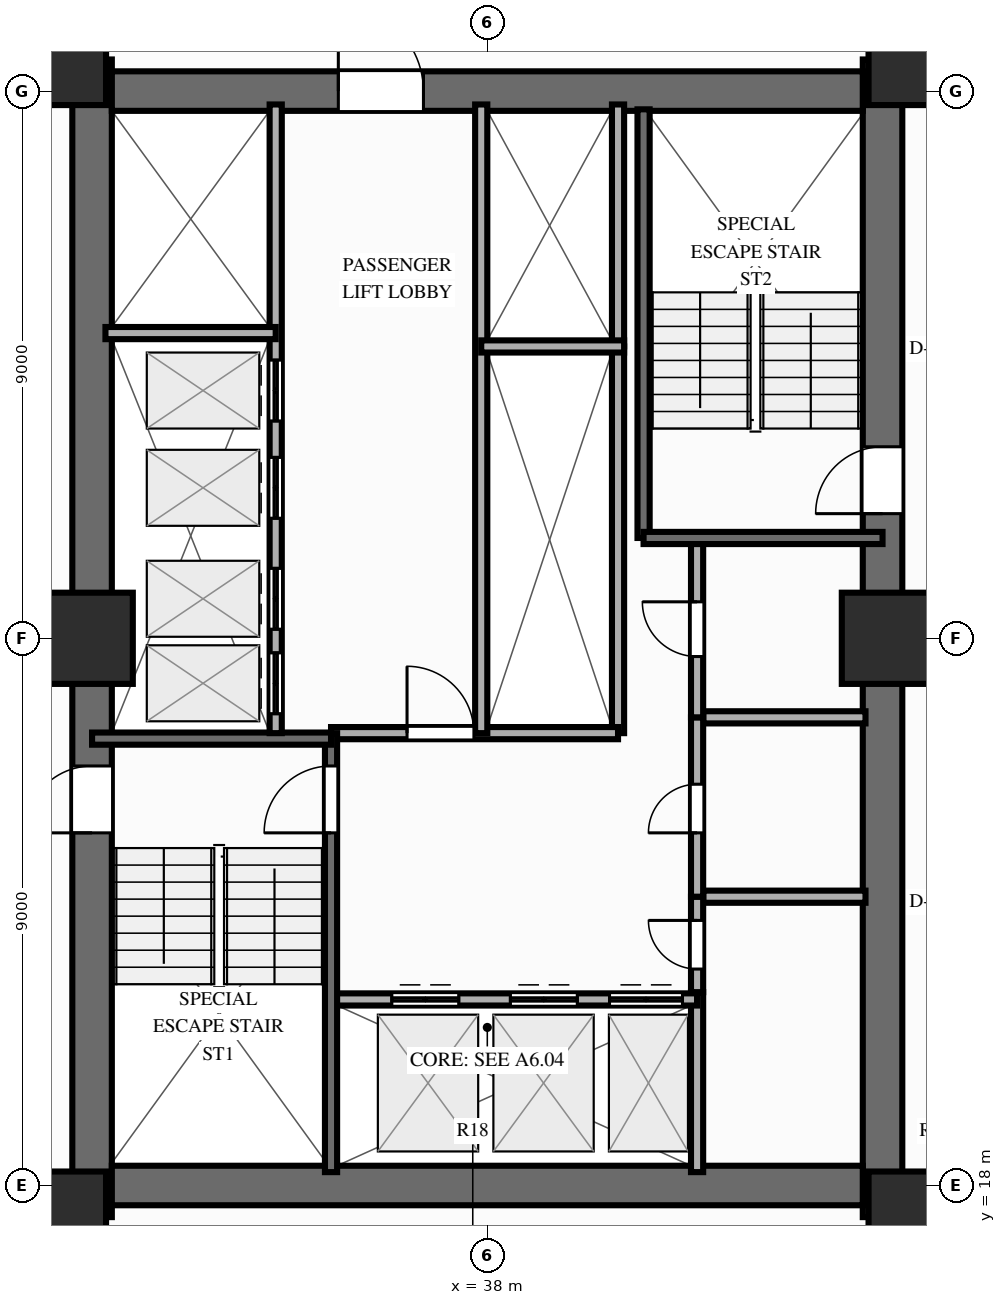
"""IFC4 building model, lengths in metres.
Left out: names, types, materials, properties, quantities, classifications, styles, units other than length and angle.
Written with IfcOpenShell. Run it as: python <this file> out.ifc"""

import sys

from ifc_helpers import new_model, si_unit, direction, frame, frame_2d, origin, origin_2d, place, context, subcontext, project, spatial, rectangle, extrude, source, transform, mapped, element, fill, save


model = new_model("IFC4")
c1 = context("Model", 3, precision=1e-05, world=origin(), true_north=direction((0.0, 1.0)))
c2 = subcontext(c1, "Body", "Model", "MODEL_VIEW")
j1 = project(units=[si_unit("LENGTHUNIT", "METRE"), si_unit("PLANEANGLEUNIT", "RADIAN")], contexts=[c1])
p1 = place(None, origin())
s1 = spatial("IfcSite", under=j1, at=p1, CompositionType="ELEMENT")
p2 = place(p1, origin())
s2 = spatial("IfcBuilding", under=s1, at=p2, CompositionType="ELEMENT")
p3 = place(p2, frame((0.0, 0.0, 61.4)))
s3 = spatial("IfcBuildingStorey", under=s2, at=p3, CompositionType="ELEMENT", Elevation=61.4)
p4 = place(p3, frame((31.5, 17.48, 0.0), z_axis=(0.0, 0.0, 1.0), x_axis=(0.0, 1.0, 0.0)))
e1 = element("IfcWall", 1, at=p4, inside=s3, PredefinedType="SHEAR", context=c2, shape_type="SweptSolid", body=[
    extrude(rectangle(XDim=19.04, YDim=0.65, at=frame_2d((9.52, 0.0))), origin(), (0.0, 0.0, 1.0), 3.0),
])
p5 = place(p4, frame((6.32, 0.0, 0.0)))
e2 = element("IfcOpeningElement", 2, at=p5, cuts=e1, PredefinedType="OPENING", context=c2, shape_type="SweptSolid", body=[
    extrude(rectangle(XDim=1.1, YDim=2.15, at=frame_2d((0.55, 1.075))), frame((0.0, 0.337, 0.0), z_axis=(0.0, -1.0, 0.0), x_axis=(1.0, 0.0, 0.0)), (0.0, 0.0, 1.0), 0.674),
])
p6 = place(p3, frame((44.5, 17.48, 0.0), z_axis=(0.0, 0.0, 1.0), x_axis=(0.0, 1.0, 0.0)))
e3 = element("IfcWall", 3, at=p6, inside=s3, PredefinedType="SHEAR", context=c2, shape_type="SweptSolid", body=[
    extrude(rectangle(XDim=19.04, YDim=0.65, at=frame_2d((9.52, 0.0))), origin(), (0.0, 0.0, 1.0), 3.0),
])
p7 = place(p6, frame((12.67, 0.0, 0.0), z_axis=(0.0, 0.0, 1.0), x_axis=(-1.0, 0.0, 0.0)))
e4 = element("IfcOpeningElement", 4, at=p7, cuts=e3, PredefinedType="OPENING", context=c2, shape_type="SweptSolid", body=[
    extrude(rectangle(XDim=1.1, YDim=2.15, at=frame_2d((0.55, 1.075))), frame((0.0, 0.337, 0.0), z_axis=(0.0, -1.0, 0.0), x_axis=(1.0, 0.0, 0.0)), (0.0, 0.0, 1.0), 0.674),
])
p8 = place(p3, frame((31.825, 18.0, 0.0), z_axis=(0.0, 0.0, 1.0), x_axis=(1.0, 0.0, 0.0)))
e5 = element("IfcWall", 5, at=p8, inside=s3, PredefinedType="SHEAR", context=c2, shape_type="SweptSolid", body=[
    extrude(rectangle(XDim=12.35, YDim=0.65, at=frame_2d((6.175, 0.0))), origin(), (0.0, 0.0, 1.0), 3.0),
])
p9 = place(p3, frame((31.825, 36.0, 0.0), z_axis=(0.0, 0.0, 1.0), x_axis=(1.0, 0.0, 0.0)))
e6 = element("IfcWall", 6, at=p9, inside=s3, PredefinedType="SHEAR", context=c2, shape_type="SweptSolid", body=[
    extrude(rectangle(XDim=12.35, YDim=0.65, at=frame_2d((6.175, 0.0))), origin(), (0.0, 0.0, 1.0), 3.0),
])
p10 = place(p9, frame((5.125, 0.0, 0.0), z_axis=(0.0, 0.0, 1.0), x_axis=(-1.0, 0.0, 0.0)))
e7 = element("IfcOpeningElement", 7, at=p10, cuts=e6, PredefinedType="OPENING", context=c2, shape_type="SweptSolid", body=[
    extrude(rectangle(XDim=1.4, YDim=2.15, at=frame_2d((0.7, 1.075))), frame((0.0, 0.337, 0.0), z_axis=(0.0, -1.0, 0.0), x_axis=(1.0, 0.0, 0.0)), (0.0, 0.0, 1.0), 0.674),
])
m1 = source(origin(), c2, "Body", "SweptSolid", [
    extrude(rectangle(XDim=1.5, YDim=1.5, at=origin_2d()), origin(), (0.0, 0.0, 1.0), 3.0),
])
for number, where, z_axis, x_axis in (
    (8, (30.98, 17.48, 0.0), (0.0, 0.0, 1.0), (1.0, 0.0, 0.0)),
    (9, (45.02, 17.48, 0.0), (0.0, 0.0, 1.0), (1.0, 0.0, 0.0)),
    (10, (30.98, 36.52, 0.0), (0.0, 0.0, 1.0), (1.0, 0.0, 0.0)),
    (11, (45.02, 36.52, 0.0), (0.0, 0.0, 1.0), (1.0, 0.0, 0.0)),
    (12, (31.42, 27.0, 0.0), (0.0, 0.0, 1.0), (1.0, 0.0, 0.0)),
    (13, (44.58, 27.0, 0.0), (0.0, 0.0, 1.0), (1.0, 0.0, 0.0)),
):
    element("IfcColumn", number, at=place(p3, frame(where, z_axis=z_axis, x_axis=x_axis)), inside=s3, PredefinedType="COLUMN", context=c2, shape_type="MappedRepresentation", body=[
        mapped(m1, transform((0.0, 0.0, 0.0), scale=1.0)),
    ])
p11 = place(p3, frame((41.55, 22.75, 0.0), z_axis=(0.0, 0.0, 1.0), x_axis=(1.0, 0.0, 0.0)))
e14 = element("IfcWall", 14, at=p11, inside=s3, PredefinedType="PARTITIONING", context=c2, shape_type="SweptSolid", body=[
    extrude(rectangle(XDim=2.67, YDim=0.2, at=frame_2d((1.335, 0.0))), origin(), (0.0, 0.0, 1.0), 2.79),
])
p12 = place(p3, frame((41.55, 25.7, 0.0), z_axis=(0.0, 0.0, 1.0), x_axis=(1.0, 0.0, 0.0)))
e15 = element("IfcWall", 15, at=p12, inside=s3, PredefinedType="PARTITIONING", context=c2, shape_type="SweptSolid", body=[
    extrude(rectangle(XDim=2.67, YDim=0.2, at=frame_2d((1.335, 0.0))), origin(), (0.0, 0.0, 1.0), 2.14),
])
p13 = place(p3, frame((41.45, 18.22, 0.0), z_axis=(0.0, 0.0, 1.0), x_axis=(0.0, 1.0, 0.0)))
e16 = element("IfcWall", 16, at=p13, inside=s3, PredefinedType="PARTITIONING", context=c2, shape_type="SweptSolid", body=[
    extrude(rectangle(XDim=2.96, YDim=0.2, at=frame_2d((1.48, 0.0))), origin(), (0.0, 0.0, 1.0), 2.79),
])
p14 = place(p3, frame((41.45, 21.18, 0.0), z_axis=(0.0, 0.0, 1.0), x_axis=(0.0, 1.0, 0.0)))
e17 = element("IfcWall", 17, at=p14, inside=s3, PredefinedType="PARTITIONING", context=c2, shape_type="SweptSolid", body=[
    extrude(rectangle(XDim=1.57, YDim=0.2, at=frame_2d((0.785, 0.0))), origin(), (0.0, 0.0, 1.0), 2.79),
])
p15 = place(p14, frame((0.38, 0.0, 0.0)))
e18 = element("IfcOpeningElement", 18, at=p15, cuts=e17, PredefinedType="OPENING", context=c2, shape_type="SweptSolid", body=[
    extrude(rectangle(XDim=0.8, YDim=2.05, at=frame_2d((0.4, 1.025))), frame((0.0, 0.112, 0.0), z_axis=(0.0, -1.0, 0.0), x_axis=(1.0, 0.0, 0.0)), (0.0, 0.0, 1.0), 0.224),
])
p16 = place(p3, frame((41.45, 22.75, 0.0), z_axis=(0.0, 0.0, 1.0), x_axis=(0.0, 1.0, 0.0)))
e19 = element("IfcWall", 19, at=p16, inside=s3, PredefinedType="PARTITIONING", context=c2, shape_type="SweptSolid", body=[
    extrude(rectangle(XDim=2.95, YDim=0.2, at=frame_2d((1.475, 0.0))), origin(), (0.0, 0.0, 1.0), 2.79),
])
p17 = place(p16, frame((1.05, 0.0, 0.0)))
e20 = element("IfcOpeningElement", 20, at=p17, cuts=e19, PredefinedType="OPENING", context=c2, shape_type="SweptSolid", body=[
    extrude(rectangle(XDim=0.8, YDim=2.05, at=frame_2d((0.4, 1.025))), frame((0.0, 0.112, 0.0), z_axis=(0.0, -1.0, 0.0), x_axis=(1.0, 0.0, 0.0)), (0.0, 0.0, 1.0), 0.224),
])
p18 = place(p3, frame((41.45, 25.7, 0.0), z_axis=(0.0, 0.0, 1.0), x_axis=(0.0, 1.0, 0.0)))
e21 = element("IfcWall", 21, at=p18, inside=s3, PredefinedType="PARTITIONING", context=c2, shape_type="SweptSolid", body=[
    extrude(rectangle(XDim=2.9, YDim=0.2, at=frame_2d((1.45, 0.0))), origin(), (0.0, 0.0, 1.0), 2.79),
])
p19 = place(p18, frame((1.0, 0.0, 0.0)))
e22 = element("IfcOpeningElement", 22, at=p19, cuts=e21, PredefinedType="OPENING", context=c2, shape_type="SweptSolid", body=[
    extrude(rectangle(XDim=0.9, YDim=2.1, at=frame_2d((0.45, 1.05))), frame((0.0, 0.112, 0.0), z_axis=(0.0, -1.0, 0.0), x_axis=(1.0, 0.0, 0.0)), (0.0, 0.0, 1.0), 0.224),
])
p20 = place(p3, frame((40.15, 25.44, 0.0), z_axis=(0.0, 0.0, 1.0), x_axis=(0.0, 1.0, 0.0)))
e23 = element("IfcWall", 23, at=p20, inside=s3, PredefinedType="PARTITIONING", context=c2, shape_type="SweptSolid", body=[
    extrude(rectangle(XDim=6.36, YDim=0.2, at=frame_2d((3.18, 0.0))), origin(), (0.0, 0.0, 1.0), 2.79),
])
p21 = place(p3, frame((40.15, 31.8, 0.0), z_axis=(0.0, 0.0, 1.0), x_axis=(0.0, 1.0, 0.0)))
e24 = element("IfcWall", 24, at=p21, inside=s3, PredefinedType="PARTITIONING", context=c2, shape_type="SweptSolid", body=[
    extrude(rectangle(XDim=3.98, YDim=0.2, at=frame_2d((1.99, 0.0))), origin(), (0.0, 0.0, 1.0), 2.79),
])
p22 = place(p3, frame((35.43, 21.06, 0.0), z_axis=(0.0, 0.0, 1.0), x_axis=(1.0, 0.0, 0.0)))
e25 = element("IfcWall", 25, at=p22, inside=s3, PredefinedType="PARTITIONING", context=c2, shape_type="SweptSolid", body=[
    extrude(rectangle(XDim=6.02, YDim=0.2, at=frame_2d((3.01, 0.0))), origin(), (0.0, 0.0, 1.0), 2.79),
])
p23 = place(p22, frame((1.0, 0.0, 0.0)))
e26 = element("IfcOpeningElement", 26, at=p23, cuts=e25, PredefinedType="OPENING", context=c2, shape_type="SweptSolid", body=[
    extrude(rectangle(XDim=1.1, YDim=2.15, at=frame_2d((0.55, 1.075))), frame((0.0, 0.112, 0.0), z_axis=(0.0, -1.0, 0.0), x_axis=(1.0, 0.0, 0.0)), (0.0, 0.0, 1.0), 0.224),
])
p24 = place(p22, frame((2.95, 0.0, 0.0)))
e27 = element("IfcOpeningElement", 27, at=p24, cuts=e25, PredefinedType="OPENING", context=c2, shape_type="SweptSolid", body=[
    extrude(rectangle(XDim=1.1, YDim=2.15, at=frame_2d((0.55, 1.075))), frame((0.0, 0.112, 0.0), z_axis=(0.0, -1.0, 0.0), x_axis=(1.0, 0.0, 0.0)), (0.0, 0.0, 1.0), 0.224),
])
p25 = place(p22, frame((4.58, 0.0, 0.0)))
e28 = element("IfcOpeningElement", 28, at=p25, cuts=e25, PredefinedType="OPENING", context=c2, shape_type="SweptSolid", body=[
    extrude(rectangle(XDim=1.2, YDim=2.15, at=frame_2d((0.6, 1.075))), frame((0.0, 0.112, 0.0), z_axis=(0.0, -1.0, 0.0), x_axis=(1.0, 0.0, 0.0)), (0.0, 0.0, 1.0), 0.224),
])
p26 = place(p3, frame((35.43, 25.44, 0.0), z_axis=(0.0, 0.0, 1.0), x_axis=(1.0, 0.0, 0.0)))
e29 = element("IfcWall", 29, at=p26, inside=s3, PredefinedType="PARTITIONING", context=c2, shape_type="SweptSolid", body=[
    extrude(rectangle(XDim=4.72, YDim=0.2, at=frame_2d((2.36, 0.0))), origin(), (0.0, 0.0, 1.0), 2.79),
])
p27 = place(p26, frame((1.25, 0.0, 0.0)))
e30 = element("IfcOpeningElement", 30, at=p27, cuts=e29, PredefinedType="OPENING", context=c2, shape_type="SweptSolid", body=[
    extrude(rectangle(XDim=1.1, YDim=2.15, at=frame_2d((0.55, 1.075))), frame((0.0, 0.112, 0.0), z_axis=(0.0, -1.0, 0.0), x_axis=(1.0, 0.0, 0.0)), (0.0, 0.0, 1.0), 0.224),
])
p28 = place(p3, frame((35.43, 18.22, 0.0), z_axis=(0.0, 0.0, 1.0), x_axis=(0.0, 1.0, 0.0)))
e31 = element("IfcWall", 31, at=p28, inside=s3, PredefinedType="SOLIDWALL", context=c2, shape_type="SweptSolid", body=[
    extrude(rectangle(XDim=7.22, YDim=0.2, at=frame_2d((3.61, 0.0))), origin(), (0.0, 0.0, 1.0), 2.79),
])
p29 = place(p28, frame((6.68, 0.0, 0.0), z_axis=(0.0, 0.0, 1.0), x_axis=(-1.0, 0.0, 0.0)))
e32 = element("IfcOpeningElement", 32, at=p29, cuts=e31, PredefinedType="OPENING", context=c2, shape_type="SweptSolid", body=[
    extrude(rectangle(XDim=1.1, YDim=2.15, at=frame_2d((0.55, 1.075))), frame((0.0, 0.112, 0.0), z_axis=(0.0, -1.0, 0.0), x_axis=(1.0, 0.0, 0.0)), (0.0, 0.0, 1.0), 0.224),
])
p30 = place(p3, frame((31.5, 25.35, 0.0), z_axis=(0.0, 0.0, 1.0), x_axis=(1.0, 0.0, 0.0)))
e33 = element("IfcWall", 33, at=p30, inside=s3, PredefinedType="SOLIDWALL", context=c2, shape_type="SweptSolid", body=[
    extrude(rectangle(XDim=3.93, YDim=0.2, at=frame_2d((1.965, 0.0))), origin(), (0.0, 0.0, 1.0), 2.79),
])
p31 = place(p3, frame((40.57, 28.65, 0.0), z_axis=(0.0, 0.0, 1.0), x_axis=(0.0, 1.0, 0.0)))
e34 = element("IfcWall", 34, at=p31, inside=s3, PredefinedType="SOLIDWALL", context=c2, shape_type="SweptSolid", body=[
    extrude(rectangle(XDim=7.05, YDim=0.2, at=frame_2d((3.525, 0.0))), origin(), (0.0, 0.0, 1.0), 2.79),
])
p32 = place(p3, frame((40.57, 28.65, 0.0), z_axis=(0.0, 0.0, 1.0), x_axis=(1.0, 0.0, 0.0)))
e35 = element("IfcWall", 35, at=p32, inside=s3, PredefinedType="SOLIDWALL", context=c2, shape_type="SweptSolid", body=[
    extrude(rectangle(XDim=3.93, YDim=0.2, at=frame_2d((1.965, 0.0))), origin(), (0.0, 0.0, 1.0), 2.79),
])
p33 = place(p3, frame((34.52, 25.44, 0.0), z_axis=(0.0, 0.0, 1.0), x_axis=(0.0, 1.0, 0.0)))
e36 = element("IfcWall", 36, at=p33, inside=s3, PredefinedType="PARTITIONING", context=c2, shape_type="SweptSolid", body=[
    extrude(rectangle(XDim=10.34, YDim=0.2, at=frame_2d((5.17, 0.0))), origin(), (0.0, 0.0, 1.0), 2.79),
])
p34 = place(p33, frame((0.32, 0.0, 0.0)))
e37 = element("IfcOpeningElement", 37, at=p34, cuts=e36, PredefinedType="OPENING", context=c2, shape_type="SweptSolid", body=[
    extrude(rectangle(XDim=1.0, YDim=2.15, at=frame_2d((0.5, 1.075))), frame((0.0, 0.112, 0.0), z_axis=(0.0, -1.0, 0.0), x_axis=(1.0, 0.0, 0.0)), (0.0, 0.0, 1.0), 0.224),
])
p35 = place(p33, frame((1.71, 0.0, 0.0)))
e38 = element("IfcOpeningElement", 38, at=p35, cuts=e36, PredefinedType="OPENING", context=c2, shape_type="SweptSolid", body=[
    extrude(rectangle(XDim=1.0, YDim=2.15, at=frame_2d((0.5, 1.075))), frame((0.0, 0.112, 0.0), z_axis=(0.0, -1.0, 0.0), x_axis=(1.0, 0.0, 0.0)), (0.0, 0.0, 1.0), 0.224),
])
p36 = place(p33, frame((3.535, 0.0, 0.0)))
e39 = element("IfcOpeningElement", 39, at=p36, cuts=e36, PredefinedType="OPENING", context=c2, shape_type="SweptSolid", body=[
    extrude(rectangle(XDim=1.0, YDim=2.15, at=frame_2d((0.5, 1.075))), frame((0.0, 0.112, 0.0), z_axis=(0.0, -1.0, 0.0), x_axis=(1.0, 0.0, 0.0)), (0.0, 0.0, 1.0), 0.224),
])
p37 = place(p33, frame((5.135, 0.0, 0.0)))
e40 = element("IfcOpeningElement", 40, at=p37, cuts=e36, PredefinedType="OPENING", context=c2, shape_type="SweptSolid", body=[
    extrude(rectangle(XDim=1.0, YDim=2.15, at=frame_2d((0.5, 1.075))), frame((0.0, 0.112, 0.0), z_axis=(0.0, -1.0, 0.0), x_axis=(1.0, 0.0, 0.0)), (0.0, 0.0, 1.0), 0.224),
])
p38 = place(p3, frame((31.72, 32.02, 0.0), z_axis=(0.0, 0.0, 1.0), x_axis=(1.0, 0.0, 0.0)))
e41 = element("IfcWall", 41, at=p38, inside=s3, PredefinedType="PARTITIONING", context=c2, shape_type="SweptSolid", body=[
    extrude(rectangle(XDim=2.8, YDim=0.2, at=frame_2d((1.4, 0.0))), origin(), (0.0, 0.0, 1.0), 2.79),
])
p39 = place(p3, frame((37.9, 25.44, 0.0), z_axis=(0.0, 0.0, 1.0), x_axis=(0.0, 1.0, 0.0)))
e42 = element("IfcWall", 42, at=p39, inside=s3, PredefinedType="PARTITIONING", context=c2, shape_type="SweptSolid", body=[
    extrude(rectangle(XDim=10.34, YDim=0.2, at=frame_2d((5.17, 0.0))), origin(), (0.0, 0.0, 1.0), 2.79),
])
p40 = place(p3, frame((37.9, 31.8, 0.0), z_axis=(0.0, 0.0, 1.0), x_axis=(1.0, 0.0, 0.0)))
e43 = element("IfcWall", 43, at=p40, inside=s3, PredefinedType="PARTITIONING", context=c2, shape_type="SweptSolid", body=[
    extrude(rectangle(XDim=2.35, YDim=0.2, at=frame_2d((1.175, 0.0))), origin(), (0.0, 0.0, 1.0), 2.79),
])
m2 = source(origin(), c2, "Body", "SweptSolid", [
    extrude(rectangle(XDim=1.1, YDim=2.15, at=frame_2d((0.55, 1.075))), frame((0.0, 0.025, 0.0), z_axis=(0.0, -1.0, 0.0), x_axis=(1.0, 0.0, 0.0)), (0.0, 0.0, 1.0), 0.05),
])
p41 = place(p5, origin())
e44 = element("IfcDoor", 44, at=p41, inside=s3, OperationType="SINGLE_SWING_LEFT", PredefinedType="DOOR", context=c2, shape_type="MappedRepresentation", body=[
    mapped(m2, transform((0.0, 0.0, 0.0), scale=1.0)),
])
fill(e2, e44)
p42 = place(p7, origin())
e45 = element("IfcDoor", 45, at=p42, inside=s3, OperationType="SINGLE_SWING_RIGHT", PredefinedType="DOOR", context=c2, shape_type="MappedRepresentation", body=[
    mapped(m2, transform((0.0, 0.0, 0.0), scale=1.0)),
])
fill(e4, e45)
m3 = source(origin(), c2, "Body", "SweptSolid", [
    extrude(rectangle(XDim=1.4, YDim=2.15, at=frame_2d((0.7, 1.075))), frame((0.0, 0.025, 0.0), z_axis=(0.0, -1.0, 0.0), x_axis=(1.0, 0.0, 0.0)), (0.0, 0.0, 1.0), 0.05),
])
p43 = place(p10, origin())
e46 = element("IfcDoor", 46, at=p43, inside=s3, OperationType="SINGLE_SWING_RIGHT", PredefinedType="DOOR", context=c2, shape_type="MappedRepresentation", body=[
    mapped(m3, transform((0.0, 0.0, 0.0), scale=1.0)),
])
fill(e7, e46)
m4 = source(origin(), c2, "Body", "SweptSolid", [
    extrude(rectangle(XDim=0.8, YDim=2.05, at=frame_2d((0.4, 1.025))), frame((0.0, 0.025, 0.0), z_axis=(0.0, -1.0, 0.0), x_axis=(1.0, 0.0, 0.0)), (0.0, 0.0, 1.0), 0.05),
])
p44 = place(p15, origin())
e47 = element("IfcDoor", 47, at=p44, inside=s3, OperationType="SINGLE_SWING_RIGHT", PredefinedType="DOOR", context=c2, shape_type="MappedRepresentation", body=[
    mapped(m4, transform((0.0, 0.0, 0.0), scale=1.0)),
])
fill(e18, e47)
p45 = place(p17, origin())
e48 = element("IfcDoor", 48, at=p45, inside=s3, OperationType="SINGLE_SWING_LEFT", PredefinedType="DOOR", context=c2, shape_type="MappedRepresentation", body=[
    mapped(m4, transform((0.0, 0.0, 0.0), scale=1.0)),
])
fill(e20, e48)
m5 = source(origin(), c2, "Body", "SweptSolid", [
    extrude(rectangle(XDim=0.9, YDim=2.1, at=frame_2d((0.45, 1.05))), frame((0.0, 0.025, 0.0), z_axis=(0.0, -1.0, 0.0), x_axis=(1.0, 0.0, 0.0)), (0.0, 0.0, 1.0), 0.05),
])
p46 = place(p19, origin())
e49 = element("IfcDoor", 49, at=p46, inside=s3, OperationType="SINGLE_SWING_RIGHT", PredefinedType="DOOR", context=c2, shape_type="MappedRepresentation", body=[
    mapped(m5, transform((0.0, 0.0, 0.0), scale=1.0)),
])
fill(e22, e49)
p47 = place(p23, origin())
e50 = element("IfcDoor", 50, at=p47, inside=s3, OperationType="DOUBLE_DOOR_SLIDING", PredefinedType="DOOR", context=c2, shape_type="MappedRepresentation", body=[
    mapped(m2, transform((0.0, 0.0, 0.0), scale=1.0)),
])
fill(e26, e50)
p48 = place(p24, origin())
e51 = element("IfcDoor", 51, at=p48, inside=s3, OperationType="DOUBLE_DOOR_SLIDING", PredefinedType="DOOR", context=c2, shape_type="MappedRepresentation", body=[
    mapped(m2, transform((0.0, 0.0, 0.0), scale=1.0)),
])
fill(e27, e51)
m6 = source(origin(), c2, "Body", "SweptSolid", [
    extrude(rectangle(XDim=1.2, YDim=2.15, at=frame_2d((0.6, 1.075))), frame((0.0, 0.025, 0.0), z_axis=(0.0, -1.0, 0.0), x_axis=(1.0, 0.0, 0.0)), (0.0, 0.0, 1.0), 0.05),
])
p49 = place(p25, origin())
e52 = element("IfcDoor", 52, at=p49, inside=s3, OperationType="DOUBLE_DOOR_SLIDING", PredefinedType="DOOR", context=c2, shape_type="MappedRepresentation", body=[
    mapped(m6, transform((0.0, 0.0, 0.0), scale=1.0)),
])
fill(e28, e52)
p50 = place(p27, origin())
e53 = element("IfcDoor", 53, at=p50, inside=s3, OperationType="SINGLE_SWING_LEFT", PredefinedType="DOOR", context=c2, shape_type="MappedRepresentation", body=[
    mapped(m2, transform((0.0, 0.0, 0.0), scale=1.0)),
])
fill(e30, e53)
p51 = place(p29, origin())
e54 = element("IfcDoor", 54, at=p51, inside=s3, OperationType="SINGLE_SWING_RIGHT", PredefinedType="DOOR", context=c2, shape_type="MappedRepresentation", body=[
    mapped(m2, transform((0.0, 0.0, 0.0), scale=1.0)),
])
fill(e32, e54)
m7 = source(origin(), c2, "Body", "SweptSolid", [
    extrude(rectangle(XDim=1.0, YDim=2.15, at=frame_2d((0.5, 1.075))), frame((0.0, 0.025, 0.0), z_axis=(0.0, -1.0, 0.0), x_axis=(1.0, 0.0, 0.0)), (0.0, 0.0, 1.0), 0.05),
])
p52 = place(p34, origin())
e55 = element("IfcDoor", 55, at=p52, inside=s3, OperationType="DOUBLE_DOOR_SLIDING", PredefinedType="DOOR", context=c2, shape_type="MappedRepresentation", body=[
    mapped(m7, transform((0.0, 0.0, 0.0), scale=1.0)),
])
fill(e37, e55)
p53 = place(p35, origin())
e56 = element("IfcDoor", 56, at=p53, inside=s3, OperationType="DOUBLE_DOOR_SLIDING", PredefinedType="DOOR", context=c2, shape_type="MappedRepresentation", body=[
    mapped(m7, transform((0.0, 0.0, 0.0), scale=1.0)),
])
fill(e38, e56)
p54 = place(p36, origin())
e57 = element("IfcDoor", 57, at=p54, inside=s3, OperationType="DOUBLE_DOOR_SLIDING", PredefinedType="DOOR", context=c2, shape_type="MappedRepresentation", body=[
    mapped(m7, transform((0.0, 0.0, 0.0), scale=1.0)),
])
fill(e39, e57)
p55 = place(p37, origin())
e58 = element("IfcDoor", 58, at=p55, inside=s3, OperationType="DOUBLE_DOOR_SLIDING", PredefinedType="DOOR", context=c2, shape_type="MappedRepresentation", body=[
    mapped(m7, transform((0.0, 0.0, 0.0), scale=1.0)),
])
fill(e40, e58)
save(model, sys.argv[1])
